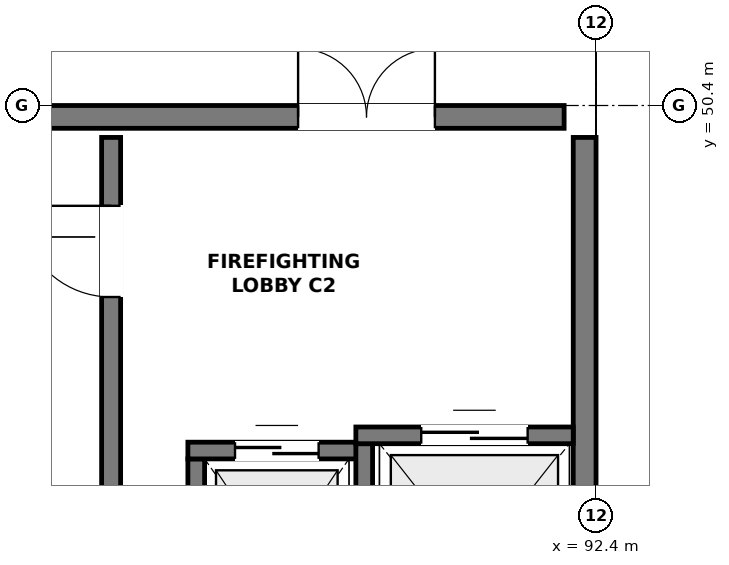
"""IFC4 building model, lengths in metres.
Left out: names, types, materials, properties, quantities, classifications, styles, units other than length and angle.
Written with IfcOpenShell. Run it as: python <this file> out.ifc"""

import sys

from ifc_helpers import new_model, si_unit, direction, frame, frame_2d, origin, place, context, subcontext, project, spatial, rectangle, extrude, element, fill, save


model = new_model("IFC4")
c1 = context("Model", 3, precision=1e-05, world=origin(), true_north=direction((0.0, 1.0)))
c2 = subcontext(c1, "Body", "Model", "MODEL_VIEW")
j1 = project(units=[si_unit("LENGTHUNIT", "METRE"), si_unit("PLANEANGLEUNIT", "RADIAN")], contexts=[c1])
p1 = place(None, origin())
s1 = spatial("IfcSite", under=j1, at=p1, CompositionType="ELEMENT")
p2 = place(p1, origin())
s2 = spatial("IfcBuilding", under=s1, at=p2, CompositionType="ELEMENT")
p3 = place(p2, frame((0.0, 0.0, 14.4)))
s3 = spatial("IfcBuildingStorey", under=s2, at=p3, CompositionType="ELEMENT", Elevation=14.4)
p4 = place(p3, frame((76.02, 50.25, 0.0), z_axis=(0.0, 0.0, 1.0), x_axis=(1.0, 0.0, 0.0)))
e1 = element("IfcWall", 1, at=p4, inside=s3, PredefinedType="SHEAR", context=c2, shape_type="SweptSolid", body=[
    extrude(rectangle(XDim=15.96, YDim=0.3, at=frame_2d((7.98, 0.0))), origin(), (0.0, 0.0, 1.0), 3.62),
])
p5 = place(p4, frame((12.46, 0.0, 0.0)))
e2 = element("IfcOpeningElement", 2, at=p5, cuts=e1, PredefinedType="OPENING", context=c2, shape_type="SweptSolid", body=[
    extrude(rectangle(XDim=1.8, YDim=2.2, at=frame_2d((0.9, 1.1))), frame((0.0, 0.162, 0.0), z_axis=(0.0, -1.0, 0.0), x_axis=(1.0, 0.0, 0.0)), (0.0, 0.0, 1.0), 0.324),
])
p6 = place(p3, frame((92.25, 42.42, 0.0), z_axis=(0.0, 0.0, 1.0), x_axis=(0.0, 1.0, 0.0)))
e3 = element("IfcWall", 3, at=p6, inside=s3, PredefinedType="SHEAR", context=c2, shape_type="SweptSolid", body=[
    extrude(rectangle(XDim=7.56, YDim=0.3, at=frame_2d((3.78, 0.0))), origin(), (0.0, 0.0, 1.0), 3.62),
])
p7 = place(p3, frame((86.02, 42.42, 0.0), z_axis=(0.0, 0.0, 1.0), x_axis=(0.0, 1.0, 0.0)))
e4 = element("IfcWall", 4, at=p7, inside=s3, PredefinedType="SHEAR", context=c2, shape_type="SweptSolid", body=[
    extrude(rectangle(XDim=7.56, YDim=0.25, at=frame_2d((3.78, 0.0))), origin(), (0.0, 0.0, 1.0), 3.62),
])
p8 = place(p7, frame((5.46, 0.0, 0.0)))
e5 = element("IfcOpeningElement", 5, at=p8, cuts=e4, PredefinedType="OPENING", context=c2, shape_type="SweptSolid", body=[
    extrude(rectangle(XDim=1.2, YDim=2.2, at=frame_2d((0.6, 1.1))), frame((0.0, 0.137, 0.0), z_axis=(0.0, -1.0, 0.0), x_axis=(1.0, 0.0, 0.0)), (0.0, 0.0, 1.0), 0.274),
])
p9 = place(p3, frame((87.14, 43.05, 0.0), z_axis=(0.0, 0.0, 1.0), x_axis=(0.0, 1.0, 0.0)))
e6 = element("IfcWall", 6, at=p9, inside=s3, PredefinedType="SOLIDWALL", context=c2, shape_type="SweptSolid", body=[
    extrude(rectangle(XDim=2.7, YDim=0.22, at=frame_2d((1.35, 0.0))), origin(), (0.0, 0.0, 1.0), 3.62),
])
p10 = place(p3, frame((87.03, 45.86, 0.0), z_axis=(0.0, 0.0, 1.0), x_axis=(1.0, 0.0, 0.0)))
e7 = element("IfcWall", 7, at=p10, inside=s3, PredefinedType="SOLIDWALL", context=c2, shape_type="SweptSolid", body=[
    extrude(rectangle(XDim=2.43, YDim=0.22, at=frame_2d((1.215, 0.0))), origin(), (0.0, 0.0, 1.0), 3.62),
])
p11 = place(p10, frame((0.62, 0.0, 0.0)))
e8 = element("IfcOpeningElement", 8, at=p11, cuts=e7, PredefinedType="OPENING", context=c2, shape_type="SweptSolid", body=[
    extrude(rectangle(XDim=1.1, YDim=2.15, at=frame_2d((0.55, 1.075))), frame((0.0, 0.122, 0.0), z_axis=(0.0, -1.0, 0.0), x_axis=(1.0, 0.0, 0.0)), (0.0, 0.0, 1.0), 0.244),
])
p12 = place(p3, frame((89.35, 42.85, 0.0), z_axis=(0.0, 0.0, 1.0), x_axis=(0.0, 1.0, 0.0)))
e9 = element("IfcWall", 9, at=p12, inside=s3, PredefinedType="SOLIDWALL", context=c2, shape_type="SweptSolid", body=[
    extrude(rectangle(XDim=3.1, YDim=0.22, at=frame_2d((1.55, 0.0))), origin(), (0.0, 0.0, 1.0), 3.62),
])
p13 = place(p3, frame((89.24, 46.06, 0.0), z_axis=(0.0, 0.0, 1.0), x_axis=(1.0, 0.0, 0.0)))
e10 = element("IfcWall", 10, at=p13, inside=s3, PredefinedType="SOLIDWALL", context=c2, shape_type="SweptSolid", body=[
    extrude(rectangle(XDim=2.86, YDim=0.22, at=frame_2d((1.43, 0.0))), origin(), (0.0, 0.0, 1.0), 3.62),
])
p14 = place(p13, frame((0.86, 0.0, 0.0)))
e11 = element("IfcOpeningElement", 11, at=p14, cuts=e10, PredefinedType="OPENING", context=c2, shape_type="SweptSolid", body=[
    extrude(rectangle(XDim=1.4, YDim=2.2, at=frame_2d((0.7, 1.1))), frame((0.0, 0.122, 0.0), z_axis=(0.0, -1.0, 0.0), x_axis=(1.0, 0.0, 0.0)), (0.0, 0.0, 1.0), 0.244),
])
p15 = place(p5, origin())
e12 = element("IfcDoor", 12, at=p15, inside=s3, OperationType="DOUBLE_DOOR_SINGLE_SWING", PredefinedType="DOOR", context=c2, shape_type="SweptSolid", body=[
    extrude(rectangle(XDim=1.8, YDim=2.2, at=frame_2d((0.9, 1.1))), frame((0.0, 0.025, 0.0), z_axis=(0.0, -1.0, 0.0), x_axis=(1.0, 0.0, 0.0)), (0.0, 0.0, 1.0), 0.05),
])
fill(e2, e12)
p16 = place(p8, origin())
e13 = element("IfcDoor", 13, at=p16, inside=s3, OperationType="SINGLE_SWING_RIGHT", PredefinedType="DOOR", context=c2, shape_type="SweptSolid", body=[
    extrude(rectangle(XDim=1.2, YDim=2.2, at=frame_2d((0.6, 1.1))), frame((0.0, 0.025, 0.0), z_axis=(0.0, -1.0, 0.0), x_axis=(1.0, 0.0, 0.0)), (0.0, 0.0, 1.0), 0.05),
])
fill(e5, e13)
p17 = place(p11, origin())
e14 = element("IfcDoor", 14, at=p17, inside=s3, OperationType="DOUBLE_DOOR_SLIDING", PredefinedType="DOOR", context=c2, shape_type="SweptSolid", body=[
    extrude(rectangle(XDim=1.1, YDim=2.15, at=frame_2d((0.55, 1.075))), frame((0.0, 0.025, 0.0), z_axis=(0.0, -1.0, 0.0), x_axis=(1.0, 0.0, 0.0)), (0.0, 0.0, 1.0), 0.05),
])
fill(e8, e14)
p18 = place(p14, origin())
e15 = element("IfcDoor", 15, at=p18, inside=s3, OperationType="DOUBLE_DOOR_SLIDING", PredefinedType="DOOR", context=c2, shape_type="SweptSolid", body=[
    extrude(rectangle(XDim=1.4, YDim=2.2, at=frame_2d((0.7, 1.1))), frame((0.0, 0.025, 0.0), z_axis=(0.0, -1.0, 0.0), x_axis=(1.0, 0.0, 0.0)), (0.0, 0.0, 1.0), 0.05),
])
fill(e11, e15)
save(model, sys.argv[1])
